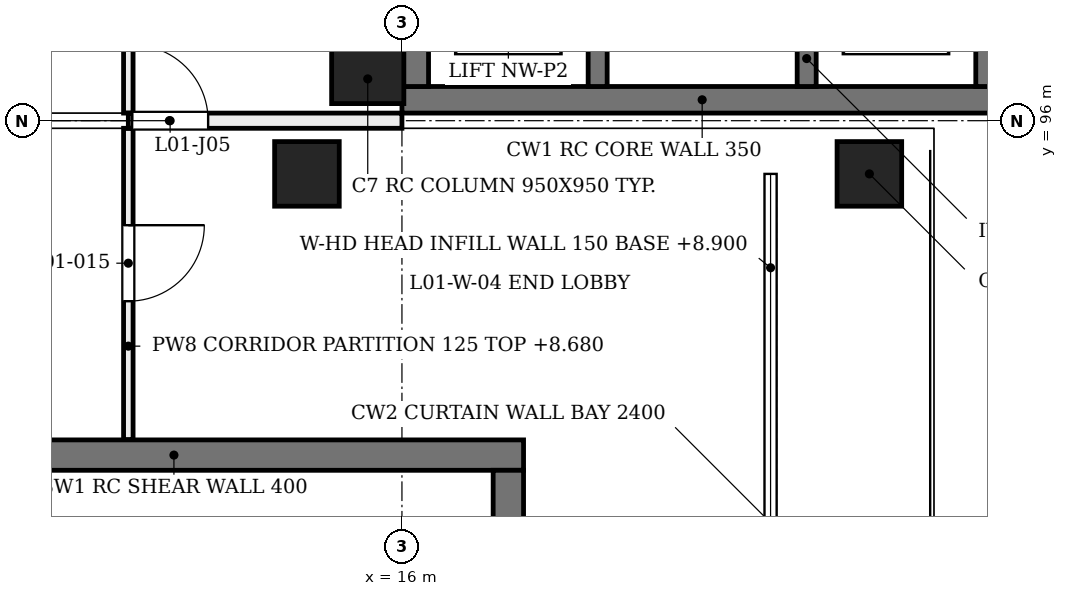
"""IFC4 building model, lengths in metres.
Left out: names, types, materials, properties, quantities, classifications, styles, units other than length and angle.
Written with IfcOpenShell. Run it as: python <this file> out.ifc"""

import sys

from ifc_helpers import new_model, si_unit, direction, frame, frame_2d, origin, origin_2d, place, context, subcontext, project, spatial, rectangle, extrude, element, fill, save


model = new_model("IFC4")
c1 = context("Model", 3, precision=1e-05, world=origin(), true_north=direction((0.0, 1.0)))
c2 = subcontext(c1, "Body", "Model", "MODEL_VIEW")
j1 = project(units=[si_unit("LENGTHUNIT", "METRE"), si_unit("PLANEANGLEUNIT", "RADIAN")], contexts=[c1])
p1 = place(None, origin())
s1 = spatial("IfcSite", under=j1, at=p1, CompositionType="ELEMENT")
p2 = place(p1, origin())
s2 = spatial("IfcBuilding", under=s1, at=p2, CompositionType="ELEMENT")
p3 = place(p2, frame((0.0, 0.0, 4.8)))
s3 = spatial("IfcBuildingStorey", under=s2, at=p3, CompositionType="ELEMENT", Elevation=4.8)
p4 = place(p3, frame((8.4, 91.6, 0.0), z_axis=(0.0, 0.0, 1.0), x_axis=(1.0, 0.0, 0.0)))
e1 = element("IfcWall", 1, at=p4, inside=s3, PredefinedType="SHEAR", context=c2, shape_type="SweptSolid", body=[
    extrude(rectangle(XDim=9.2, YDim=0.4, at=frame_2d((4.6, 0.0))), origin(), (0.0, 0.0, 1.0), 4.58),
])
p5 = place(p3, frame((17.4, 84.0, 0.0), z_axis=(0.0, 0.0, 1.0), x_axis=(0.0, 1.0, 0.0)))
e2 = element("IfcWall", 2, at=p5, inside=s3, PredefinedType="SHEAR", context=c2, shape_type="SweptSolid", body=[
    extrude(rectangle(XDim=7.4, YDim=0.4, at=frame_2d((3.7, 0.0))), origin(), (0.0, 0.0, 1.0), 4.58),
])
p6 = place(p3, frame((16.0, 96.275, 0.0), z_axis=(0.0, 0.0, 1.0), x_axis=(1.0, 0.0, 0.0)))
e3 = element("IfcWall", 3, at=p6, inside=s3, PredefinedType="SHEAR", context=c2, shape_type="SweptSolid", body=[
    extrude(rectangle(XDim=7.9, YDim=0.35, at=frame_2d((3.95, 0.0))), origin(), (0.0, 0.0, 1.0), 4.58),
])
p7 = place(p3, frame((16.175, 96.45, 0.0), z_axis=(0.0, 0.0, 1.0), x_axis=(0.0, 1.0, 0.0)))
e4 = element("IfcWall", 4, at=p7, inside=s3, PredefinedType="SHEAR", context=c2, shape_type="SweptSolid", body=[
    extrude(rectangle(XDim=15.2, YDim=0.35, at=frame_2d((7.6, 0.0))), origin(), (0.0, 0.0, 1.0), 4.58),
])
p8 = place(p7, frame((13.25, 0.0, 0.0)))
e5 = element("IfcOpeningElement", 5, at=p8, cuts=e4, PredefinedType="OPENING", context=c2, shape_type="SweptSolid", body=[
    extrude(rectangle(XDim=1.0, YDim=2.1, at=frame_2d((0.5, 1.05))), frame((0.0, 0.185, 0.0), z_axis=(0.0, -1.0, 0.0), x_axis=(1.0, 0.0, 0.0)), (0.0, 0.0, 1.0), 0.37),
])
p9 = place(p7, frame((3.2, 0.0, 0.0)))
e6 = element("IfcOpeningElement", 6, at=p9, cuts=e4, PredefinedType="OPENING", context=c2, shape_type="SweptSolid", body=[
    extrude(rectangle(XDim=1.4, YDim=2.1, at=frame_2d((0.7, 1.05))), frame((0.0, 0.185, 0.0), z_axis=(0.0, -1.0, 0.0), x_axis=(1.0, 0.0, 0.0)), (0.0, 0.0, 1.0), 0.37),
])
p10 = place(p3, frame((23.725, 96.45, 0.0), z_axis=(0.0, 0.0, 1.0), x_axis=(0.0, 1.0, 0.0)))
e7 = element("IfcWall", 7, at=p10, inside=s3, PredefinedType="SHEAR", context=c2, shape_type="SweptSolid", body=[
    extrude(rectangle(XDim=15.2, YDim=0.35, at=frame_2d((7.6, 0.0))), origin(), (0.0, 0.0, 1.0), 4.58),
])
p11 = place(p10, frame((13.25, 0.0, 0.0)))
e8 = element("IfcOpeningElement", 8, at=p11, cuts=e7, PredefinedType="OPENING", context=c2, shape_type="SweptSolid", body=[
    extrude(rectangle(XDim=1.0, YDim=2.1, at=frame_2d((0.5, 1.05))), frame((0.0, 0.185, 0.0), z_axis=(0.0, -1.0, 0.0), x_axis=(1.0, 0.0, 0.0)), (0.0, 0.0, 1.0), 0.37),
])
p12 = place(p10, frame((3.2, 0.0, 0.0)))
e9 = element("IfcOpeningElement", 9, at=p12, cuts=e7, PredefinedType="OPENING", context=c2, shape_type="SweptSolid", body=[
    extrude(rectangle(XDim=1.4, YDim=2.1, at=frame_2d((0.7, 1.05))), frame((0.0, 0.185, 0.0), z_axis=(0.0, -1.0, 0.0), x_axis=(1.0, 0.0, 0.0)), (0.0, 0.0, 1.0), 0.37),
])
p13 = place(p3, frame((15.55, 96.7, 0.0), z_axis=(0.0, 0.0, 1.0), x_axis=(1.0, 0.0, 0.0)))
e10 = element("IfcColumn", 10, at=p13, inside=s3, PredefinedType="COLUMN", context=c2, shape_type="SweptSolid", body=[
    extrude(rectangle(XDim=0.95, YDim=0.95, at=origin_2d()), origin(), (0.0, 0.0, 1.0), 4.8),
])
for number, where, z_axis, x_axis in (
    (11, (15.0, 95.3, 0.0), (-0.204, 0.0, 0.979), (0.0, -1.0, 0.0)),
    (12, (22.4, 95.3, 0.0), (-0.204, 0.0, 0.979), (0.0, -1.0, 0.0)),
):
    element("IfcColumn", number, at=place(p3, frame(where, z_axis=z_axis, x_axis=x_axis)), inside=s3, PredefinedType="COLUMN", context=c2, shape_type="SweptSolid", body=[
        extrude(rectangle(XDim=0.85, YDim=0.85, at=origin_2d()), origin(), (0.0, 0.0, 1.0), 4.903),
    ])
p14 = place(p3, frame((20.85, 88.2, 4.1), z_axis=(0.0, 0.0, 1.0), x_axis=(0.0, 1.0, 0.0)))
e13 = element("IfcWall", 13, at=p14, inside=s3, PredefinedType="SOLIDWALL", context=c2, shape_type="SweptSolid", body=[
    extrude(rectangle(XDim=6.9, YDim=0.15, at=frame_2d((3.45, 0.0))), origin(), (0.0, 0.0, 1.0), 0.48),
])
for number, where, z_axis, x_axis in (
    (14, (18.575, 98.9, 0.0), (0.0, 0.0, 1.0), (0.0, -1.0, 0.0)),
    (15, (21.325, 98.9, 0.0), (0.0, 0.0, 1.0), (0.0, -1.0, 0.0)),
):
    element("IfcWall", number, at=place(p3, frame(where, z_axis=z_axis, x_axis=x_axis)), inside=s3, PredefinedType="SOLIDWALL", context=c2, shape_type="SweptSolid", body=[
        extrude(rectangle(XDim=2.45, YDim=0.25, at=frame_2d((1.225, 0.0))), origin(), (0.0, 0.0, 1.0), 4.55),
    ])
p15 = place(p3, frame((12.4, 91.805, 0.0), z_axis=(0.0, 0.0, 1.0), x_axis=(0.0, 1.0, 0.0)))
e16 = element("IfcWall", 16, at=p15, inside=s3, PredefinedType="PARTITIONING", context=c2, shape_type="SweptSolid", body=[
    extrude(rectangle(XDim=4.095, YDim=0.125, at=frame_2d((2.047, 0.0))), origin(), (0.0, 0.0, 1.0), 3.88),
])
p16 = place(p15, frame((1.82, 0.0, 0.0)))
e17 = element("IfcOpeningElement", 17, at=p16, cuts=e16, PredefinedType="OPENING", context=c2, shape_type="SweptSolid", body=[
    extrude(rectangle(XDim=1.0, YDim=2.1, at=frame_2d((0.5, 1.05))), frame((0.0, 0.073, 0.0), z_axis=(0.0, -1.0, 0.0), x_axis=(1.0, 0.0, 0.0)), (0.0, 0.0, 1.0), 0.145),
])
p17 = place(p3, frame((12.4, 96.1, 0.0), z_axis=(0.0, 0.0, 1.0), x_axis=(0.0, 1.0, 0.0)))
e18 = element("IfcWall", 18, at=p17, inside=s3, PredefinedType="PARTITIONING", context=c2, shape_type="SweptSolid", body=[
    extrude(rectangle(XDim=8.958, YDim=0.125, at=frame_2d((4.479, 0.0))), origin(), (0.0, 0.0, 1.0), 3.88),
])
p18 = place(p17, frame((6.275, 0.0, 0.0)))
e19 = element("IfcOpeningElement", 19, at=p18, cuts=e18, PredefinedType="OPENING", context=c2, shape_type="SweptSolid", body=[
    extrude(rectangle(XDim=1.0, YDim=2.1, at=frame_2d((0.5, 1.05))), frame((0.0, 0.073, 0.0), z_axis=(0.0, -1.0, 0.0), x_axis=(1.0, 0.0, 0.0)), (0.0, 0.0, 1.0), 0.145),
])
p19 = place(p17, frame((1.765, 0.0, 0.0)))
e20 = element("IfcOpeningElement", 20, at=p19, cuts=e18, PredefinedType="OPENING", context=c2, shape_type="SweptSolid", body=[
    extrude(rectangle(XDim=1.0, YDim=2.1, at=frame_2d((0.5, 1.05))), frame((0.0, 0.073, 0.0), z_axis=(0.0, -1.0, 0.0), x_axis=(1.0, 0.0, 0.0)), (0.0, 0.0, 1.0), 0.145),
])
p20 = place(p3, frame((12.4, 96.0, 0.0), z_axis=(0.0, 0.0, 1.0), x_axis=(1.0, 0.0, 0.0)))
e21 = element("IfcWall", 21, at=p20, inside=s3, PredefinedType="PARTITIONING", context=c2, shape_type="SweptSolid", body=[
    extrude(rectangle(XDim=3.6, YDim=0.2, at=frame_2d((1.8, 0.0))), origin(), (0.0, 0.0, 1.0), 3.88),
])
p21 = place(p20, frame((0.05, 0.0, 0.0)))
e22 = element("IfcOpeningElement", 22, at=p21, cuts=e21, PredefinedType="OPENING", context=c2, shape_type="SweptSolid", body=[
    extrude(rectangle(XDim=1.0, YDim=2.1, at=frame_2d((0.5, 1.05))), frame((0.0, 0.11, 0.0), z_axis=(0.0, -1.0, 0.0), x_axis=(1.0, 0.0, 0.0)), (0.0, 0.0, 1.0), 0.22),
])
p22 = place(p16, origin())
e23 = element("IfcDoor", 23, at=p22, inside=s3, OperationType="SINGLE_SWING_RIGHT", PredefinedType="DOOR", context=c2, shape_type="SweptSolid", body=[
    extrude(rectangle(XDim=1.0, YDim=2.1, at=frame_2d((0.5, 1.05))), frame((0.0, 0.025, 0.0), z_axis=(0.0, -1.0, 0.0), x_axis=(1.0, 0.0, 0.0)), (0.0, 0.0, 1.0), 0.05),
])
fill(e17, e23)
p23 = place(p21, origin())
e24 = element("IfcDoor", 24, at=p23, inside=s3, OperationType="SINGLE_SWING_LEFT", PredefinedType="DOOR", context=c2, shape_type="SweptSolid", body=[
    extrude(rectangle(XDim=1.0, YDim=2.1, at=frame_2d((0.5, 1.05))), frame((0.0, 0.025, 0.0), z_axis=(0.0, -1.0, 0.0), x_axis=(1.0, 0.0, 0.0)), (0.0, 0.0, 1.0), 0.05),
])
fill(e22, e24)
save(model, sys.argv[1])
